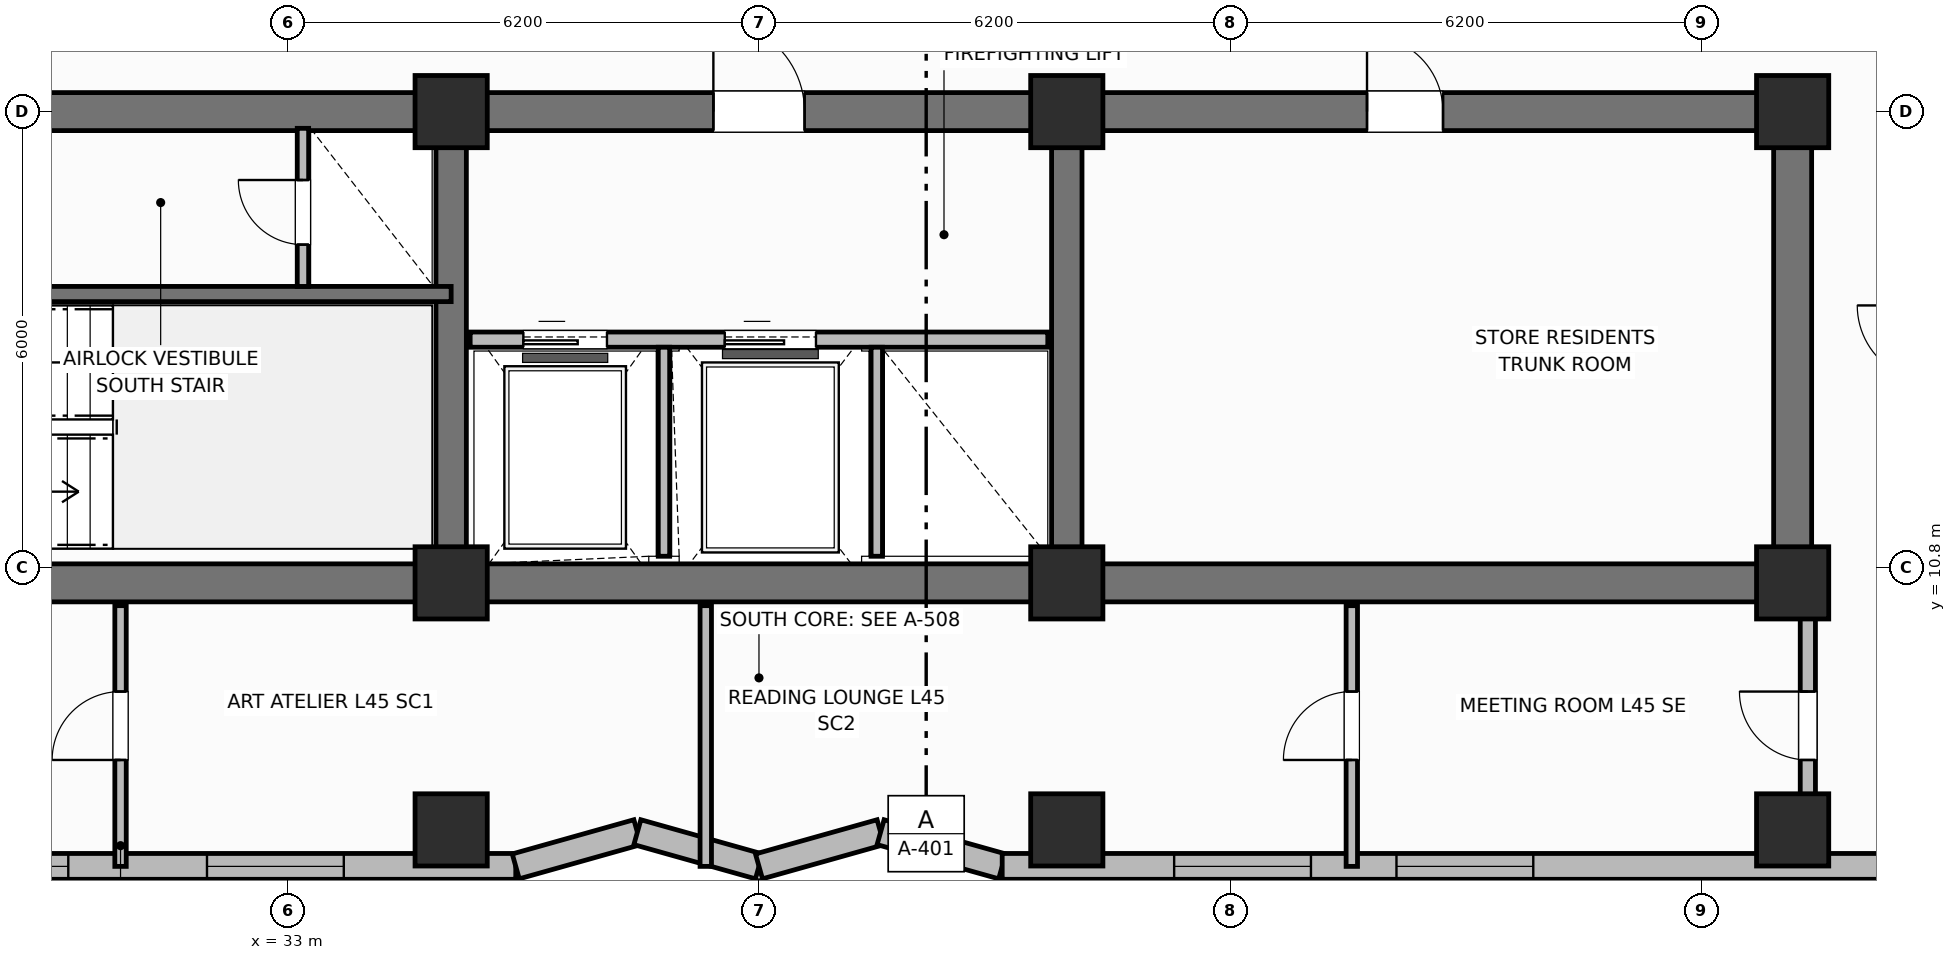
"""IFC4 building model, lengths in metres.
Left out: names, types, materials, properties, quantities, classifications, styles, units other than length and angle.
Written with IfcOpenShell. Run it as: python <this file> out.ifc"""

import sys

from ifc_helpers import new_model, si_unit, direction, frame, frame_2d, origin, origin_2d, place, context, subcontext, project, spatial, rectangle, extrude, element, fill, save


model = new_model("IFC4")
c1 = context("Model", 3, precision=1e-05, world=origin(), true_north=direction((0.0, 1.0)))
c2 = subcontext(c1, "Body", "Model", "MODEL_VIEW")
j1 = project(units=[si_unit("LENGTHUNIT", "METRE"), si_unit("PLANEANGLEUNIT", "RADIAN")], contexts=[c1])
p1 = place(None, origin())
s1 = spatial("IfcSite", under=j1, at=p1, CompositionType="ELEMENT")
p2 = place(p1, origin())
s2 = spatial("IfcBuilding", under=s1, at=p2, CompositionType="ELEMENT")
p3 = place(p2, frame((0.0, 0.0, 181.1)))
s3 = spatial("IfcBuildingStorey", under=s2, at=p3, CompositionType="ELEMENT", Elevation=181.1)
p4 = place(p3, frame((52.8, 10.6, 0.0), z_axis=(0.0, 0.0, 1.0), x_axis=(-1.0, 0.0, 0.0)))
e1 = element("IfcWall", 1, at=p4, inside=s3, PredefinedType="SHEAR", context=c2, shape_type="SweptSolid", body=[
    extrude(rectangle(XDim=27.2, YDim=0.5, at=frame_2d((13.6, 0.0))), origin(), (0.0, 0.0, 1.0), 3.7),
])
p5 = place(p3, frame((52.8, 10.85, 0.0), z_axis=(0.0, 0.0, 1.0), x_axis=(0.0, 1.0, 0.0)))
e2 = element("IfcWall", 2, at=p5, inside=s3, PredefinedType="SHEAR", context=c2, shape_type="SweptSolid", body=[
    extrude(rectangle(XDim=5.7, YDim=0.5, at=frame_2d((2.85, 0.0))), origin(), (0.0, 0.0, 1.0), 3.7),
])
p6 = place(p3, frame((25.6, 16.8, 0.0), z_axis=(0.0, 0.0, 1.0), x_axis=(1.0, 0.0, 0.0)))
e3 = element("IfcWall", 3, at=p6, inside=s3, PredefinedType="SHEAR", context=c2, shape_type="SweptSolid", body=[
    extrude(rectangle(XDim=27.2, YDim=0.5, at=frame_2d((13.6, 0.0))), origin(), (0.0, 0.0, 1.0), 3.7),
])
p7 = place(p6, frame((1.9, 0.0, 0.0)))
e4 = element("IfcOpeningElement", 4, at=p7, cuts=e3, PredefinedType="OPENING", context=c2, shape_type="SweptSolid", body=[
    extrude(rectangle(XDim=1.1, YDim=2.15, at=frame_2d((0.55, 1.075))), frame((0.0, 0.26, 0.0), z_axis=(0.0, -1.0, 0.0), x_axis=(1.0, 0.0, 0.0)), (0.0, 0.0, 1.0), 0.52),
])
p8 = place(p6, frame((13.0, 0.0, 0.0)))
e5 = element("IfcOpeningElement", 5, at=p8, cuts=e3, PredefinedType="OPENING", context=c2, shape_type="SweptSolid", body=[
    extrude(rectangle(XDim=1.2, YDim=2.15, at=frame_2d((0.6, 1.075))), frame((0.0, 0.26, 0.0), z_axis=(0.0, -1.0, 0.0), x_axis=(1.0, 0.0, 0.0)), (0.0, 0.0, 1.0), 0.52),
])
p9 = place(p6, frame((21.6, 0.0, 0.0)))
e6 = element("IfcOpeningElement", 6, at=p9, cuts=e3, PredefinedType="OPENING", context=c2, shape_type="SweptSolid", body=[
    extrude(rectangle(XDim=1.0, YDim=2.15, at=frame_2d((0.5, 1.075))), frame((0.0, 0.26, 0.0), z_axis=(0.0, -1.0, 0.0), x_axis=(1.0, 0.0, 0.0)), (0.0, 0.0, 1.0), 0.52),
])
for number, where, z_axis, x_axis in (
    (7, (35.15, 10.85, 0.0), (0.0, 0.0, 1.0), (0.0, 1.0, 0.0)),
    (8, (43.25, 10.85, 0.0), (0.0, 0.0, 1.0), (0.0, 1.0, 0.0)),
):
    element("IfcWall", number, at=place(p3, frame(where, z_axis=z_axis, x_axis=x_axis)), inside=s3, PredefinedType="SHEAR", context=c2, shape_type="SweptSolid", body=[
        extrude(rectangle(XDim=5.7, YDim=0.4, at=frame_2d((2.85, 0.0))), origin(), (0.0, 0.0, 1.0), 3.7),
    ])
for number, where, z_axis, x_axis in (
    (9, (35.15, 10.6, 0.0), (0.0, 0.0, 1.0), (1.0, 0.0, 0.0)),
    (10, (35.15, 16.8, 0.0), (0.0, 0.0, 1.0), (1.0, 0.0, 0.0)),
    (11, (43.25, 10.6, 0.0), (0.0, 0.0, 1.0), (1.0, 0.0, 0.0)),
    (12, (43.25, 16.8, 0.0), (0.0, 0.0, 1.0), (1.0, 0.0, 0.0)),
    (13, (52.8, 10.6, 0.0), (0.0, 0.0, 1.0), (1.0, 0.0, 0.0)),
    (14, (52.8, 16.8, 0.0), (0.0, 0.0, 1.0), (1.0, 0.0, 0.0)),
    (15, (35.15, 7.35, 0.0), (0.0, 0.0, 1.0), (1.0, 0.0, 0.0)),
    (16, (43.25, 7.35, 0.0), (0.0, 0.0, 1.0), (1.0, 0.0, 0.0)),
    (17, (52.8, 7.35, 0.0), (0.0, 0.0, 1.0), (1.0, 0.0, 0.0)),
):
    element("IfcColumn", number, at=place(p3, frame(where, z_axis=z_axis, x_axis=x_axis)), inside=s3, PredefinedType="COLUMN", context=c2, shape_type="SweptSolid", body=[
        extrude(rectangle(XDim=0.95, YDim=0.95, at=origin_2d()), origin(), (0.0, 0.0, 1.0), 3.7),
    ])
p10 = place(p3, frame((20.2, 6.87, 0.0), z_axis=(0.0, 0.0, 1.0), x_axis=(1.0, 0.0, 0.0)))
e18 = element("IfcWall", 18, at=p10, inside=s3, PredefinedType="SOLIDWALL", context=c2, shape_type="SweptSolid", body=[
    extrude(rectangle(XDim=15.8, YDim=0.34, at=frame_2d((7.9, 0.0))), origin(), (0.0, 0.0, 1.0), 2.72),
])
p11 = place(p10, frame((8.113, 0.0, 0.75)))
e19 = element("IfcOpeningElement", 19, at=p11, cuts=e18, PredefinedType="OPENING", context=c2, shape_type="SweptSolid", body=[
    extrude(rectangle(XDim=1.8, YDim=1.85, at=frame_2d((0.9, 0.925))), frame((0.0, 0.18, 0.0), z_axis=(0.0, -1.0, 0.0), x_axis=(1.0, 0.0, 0.0)), (0.0, 0.0, 1.0), 0.36),
])
p12 = place(p10, frame((11.738, 0.0, 0.75)))
e20 = element("IfcOpeningElement", 20, at=p12, cuts=e18, PredefinedType="OPENING", context=c2, shape_type="SweptSolid", body=[
    extrude(rectangle(XDim=1.8, YDim=1.85, at=frame_2d((0.9, 0.925))), frame((0.0, 0.18, 0.0), z_axis=(0.0, -1.0, 0.0), x_axis=(1.0, 0.0, 0.0)), (0.0, 0.0, 1.0), 0.36),
])
p13 = place(p3, frame((36.0, 6.87, 0.0), z_axis=(0.0, 0.0, 1.0), x_axis=(0.962662902433, 0.270703040766, 0.0)))
e21 = element("IfcWall", 21, at=p13, inside=s3, PredefinedType="SOLIDWALL", context=c2, shape_type="SweptSolid", body=[
    extrude(rectangle(XDim=1.662, YDim=0.34, at=frame_2d((0.831, 0.0))), origin(), (0.0, 0.0, 1.0), 2.72),
])
p14 = place(p3, frame((37.6, 7.32, 0.0), z_axis=(0.0, 0.0, 1.0), x_axis=(0.962652136636, -0.270741322725, 0.0)))
e22 = element("IfcWall", 22, at=p14, inside=s3, PredefinedType="SOLIDWALL", context=c2, shape_type="SweptSolid", body=[
    extrude(rectangle(XDim=1.662, YDim=0.34, at=frame_2d((0.831, 0.0))), origin(), (0.0, 0.0, 1.0), 2.72),
])
p15 = place(p3, frame((39.2, 6.87, 0.0), z_axis=(0.0, 0.0, 1.0), x_axis=(0.962662902433, 0.270703040766, 0.0)))
e23 = element("IfcWall", 23, at=p15, inside=s3, PredefinedType="SOLIDWALL", context=c2, shape_type="SweptSolid", body=[
    extrude(rectangle(XDim=1.662, YDim=0.34, at=frame_2d((0.831, 0.0))), origin(), (0.0, 0.0, 1.0), 2.72),
])
p16 = place(p3, frame((40.8, 7.32, 0.0), z_axis=(0.0, 0.0, 1.0), x_axis=(0.962652136636, -0.270741322725, 0.0)))
e24 = element("IfcWall", 24, at=p16, inside=s3, PredefinedType="SOLIDWALL", context=c2, shape_type="SweptSolid", body=[
    extrude(rectangle(XDim=1.662, YDim=0.34, at=frame_2d((0.831, 0.0))), origin(), (0.0, 0.0, 1.0), 2.72),
])
p17 = place(p3, frame((42.4, 6.87, 0.0), z_axis=(0.0, 0.0, 1.0), x_axis=(1.0, 0.0, 0.0)))
e25 = element("IfcWall", 25, at=p17, inside=s3, PredefinedType="SOLIDWALL", context=c2, shape_type="SweptSolid", body=[
    extrude(rectangle(XDim=15.8, YDim=0.34, at=frame_2d((7.9, 0.0))), origin(), (0.0, 0.0, 1.0), 2.72),
])
p18 = place(p17, frame((2.262, 0.0, 0.75)))
e26 = element("IfcOpeningElement", 26, at=p18, cuts=e25, PredefinedType="OPENING", context=c2, shape_type="SweptSolid", body=[
    extrude(rectangle(XDim=1.8, YDim=1.85, at=frame_2d((0.9, 0.925))), frame((0.0, 0.18, 0.0), z_axis=(0.0, -1.0, 0.0), x_axis=(1.0, 0.0, 0.0)), (0.0, 0.0, 1.0), 0.36),
])
p19 = place(p17, frame((5.188, 0.0, 0.75)))
e27 = element("IfcOpeningElement", 27, at=p19, cuts=e25, PredefinedType="OPENING", context=c2, shape_type="SweptSolid", body=[
    extrude(rectangle(XDim=1.8, YDim=1.85, at=frame_2d((0.9, 0.925))), frame((0.0, 0.18, 0.0), z_axis=(0.0, -1.0, 0.0), x_axis=(1.0, 0.0, 0.0)), (0.0, 0.0, 1.0), 0.36),
])
p20 = place(p17, frame((12.788, 0.0, 0.75)))
e28 = element("IfcOpeningElement", 28, at=p20, cuts=e25, PredefinedType="OPENING", context=c2, shape_type="SweptSolid", body=[
    extrude(rectangle(XDim=1.8, YDim=1.85, at=frame_2d((0.9, 0.925))), frame((0.0, 0.18, 0.0), z_axis=(0.0, -1.0, 0.0), x_axis=(1.0, 0.0, 0.0)), (0.0, 0.0, 1.0), 0.36),
])
p21 = place(p3, frame((25.6, 14.4, 0.0), z_axis=(0.0, 0.0, 1.0), x_axis=(1.0, 0.0, 0.0)))
e29 = element("IfcWall", 29, at=p21, inside=s3, PredefinedType="SHEAR", context=c2, shape_type="SweptSolid", body=[
    extrude(rectangle(XDim=9.55, YDim=0.2, at=frame_2d((4.775, 0.0))), origin(), (0.0, 0.0, 1.0), 3.7),
])
p22 = place(p21, frame((1.05, 0.0, 0.0)))
e30 = element("IfcOpeningElement", 30, at=p22, cuts=e29, PredefinedType="OPENING", context=c2, shape_type="SweptSolid", body=[
    extrude(rectangle(XDim=1.1, YDim=2.15, at=frame_2d((0.55, 1.075))), frame((0.0, 0.11, 0.0), z_axis=(0.0, -1.0, 0.0), x_axis=(1.0, 0.0, 0.0)), (0.0, 0.0, 1.0), 0.22),
])
p23 = place(p3, frame((33.2, 14.5, 0.0), z_axis=(0.0, 0.0, 1.0), x_axis=(0.0, 1.0, 0.0)))
e31 = element("IfcWall", 31, at=p23, inside=s3, PredefinedType="PARTITIONING", context=c2, shape_type="SweptSolid", body=[
    extrude(rectangle(XDim=2.08, YDim=0.15, at=frame_2d((1.04, 0.0))), origin(), (0.0, 0.0, 1.0), 2.55),
])
p24 = place(p23, frame((0.55, 0.0, 0.0)))
e32 = element("IfcOpeningElement", 32, at=p24, cuts=e31, PredefinedType="OPENING", context=c2, shape_type="SweptSolid", body=[
    extrude(rectangle(XDim=0.85, YDim=2.05, at=frame_2d((0.425, 1.025))), frame((0.0, 0.085, 0.0), z_axis=(0.0, -1.0, 0.0), x_axis=(1.0, 0.0, 0.0)), (0.0, 0.0, 1.0), 0.17),
])
p25 = place(p3, frame((35.4, 13.8, 0.0), z_axis=(0.0, 0.0, 1.0), x_axis=(1.0, 0.0, 0.0)))
e33 = element("IfcWall", 33, at=p25, inside=s3, PredefinedType="PARTITIONING", context=c2, shape_type="SweptSolid", body=[
    extrude(rectangle(XDim=7.6, YDim=0.2, at=frame_2d((3.8, 0.0))), origin(), (0.0, 0.0, 1.0), 2.32),
])
p26 = place(p25, frame((0.7, 0.0, 0.0)))
e34 = element("IfcOpeningElement", 34, at=p26, cuts=e33, PredefinedType="OPENING", context=c2, shape_type="SweptSolid", body=[
    extrude(rectangle(XDim=1.1, YDim=2.15, at=frame_2d((0.55, 1.075))), frame((0.0, 0.11, 0.0), z_axis=(0.0, -1.0, 0.0), x_axis=(1.0, 0.0, 0.0)), (0.0, 0.0, 1.0), 0.22),
])
p27 = place(p25, frame((3.35, 0.0, 0.0)))
e35 = element("IfcOpeningElement", 35, at=p27, cuts=e33, PredefinedType="OPENING", context=c2, shape_type="SweptSolid", body=[
    extrude(rectangle(XDim=1.2, YDim=2.15, at=frame_2d((0.6, 1.075))), frame((0.0, 0.11, 0.0), z_axis=(0.0, -1.0, 0.0), x_axis=(1.0, 0.0, 0.0)), (0.0, 0.0, 1.0), 0.22),
])
for number, where, z_axis, x_axis in (
    (36, (37.95, 10.95, 0.0), (0.0, 0.0, 1.0), (0.0, 1.0, 0.0)),
    (37, (40.75, 10.95, 0.0), (0.0, 0.0, 1.0), (0.0, 1.0, 0.0)),
):
    element("IfcWall", number, at=place(p3, frame(where, z_axis=z_axis, x_axis=x_axis)), inside=s3, PredefinedType="PARTITIONING", context=c2, shape_type="SweptSolid", body=[
        extrude(rectangle(XDim=2.75, YDim=0.15, at=frame_2d((1.375, 0.0))), origin(), (0.0, 0.0, 1.0), 2.55),
    ])
p28 = place(p3, frame((30.8, 6.87, 0.0), z_axis=(0.0, 0.0, 1.0), x_axis=(0.0, 1.0, 0.0)))
e38 = element("IfcWall", 38, at=p28, inside=s3, PredefinedType="PARTITIONING", context=c2, shape_type="SweptSolid", body=[
    extrude(rectangle(XDim=3.43, YDim=0.15, at=frame_2d((1.715, 0.0))), origin(), (0.0, 0.0, 1.0), 2.55),
])
p29 = place(p28, frame((1.4, 0.0, 0.0)))
e39 = element("IfcOpeningElement", 39, at=p29, cuts=e38, PredefinedType="OPENING", context=c2, shape_type="SweptSolid", body=[
    extrude(rectangle(XDim=0.9, YDim=2.1, at=frame_2d((0.45, 1.05))), frame((0.0, 0.085, 0.0), z_axis=(0.0, -1.0, 0.0), x_axis=(1.0, 0.0, 0.0)), (0.0, 0.0, 1.0), 0.17),
])
p30 = place(p3, frame((38.5, 6.87, 0.0), z_axis=(0.0, 0.0, 1.0), x_axis=(0.0, 1.0, 0.0)))
e40 = element("IfcWall", 40, at=p30, inside=s3, PredefinedType="PARTITIONING", context=c2, shape_type="SweptSolid", body=[
    extrude(rectangle(XDim=3.43, YDim=0.15, at=frame_2d((1.715, 0.0))), origin(), (0.0, 0.0, 1.0), 2.55),
])
p31 = place(p3, frame((47.0, 6.87, 0.0), z_axis=(0.0, 0.0, 1.0), x_axis=(0.0, 1.0, 0.0)))
e41 = element("IfcWall", 41, at=p31, inside=s3, PredefinedType="PARTITIONING", context=c2, shape_type="SweptSolid", body=[
    extrude(rectangle(XDim=3.43, YDim=0.15, at=frame_2d((1.715, 0.0))), origin(), (0.0, 0.0, 1.0), 2.55),
])
p32 = place(p31, frame((1.4, 0.0, 0.0)))
e42 = element("IfcOpeningElement", 42, at=p32, cuts=e41, PredefinedType="OPENING", context=c2, shape_type="SweptSolid", body=[
    extrude(rectangle(XDim=0.9, YDim=2.1, at=frame_2d((0.45, 1.05))), frame((0.0, 0.085, 0.0), z_axis=(0.0, -1.0, 0.0), x_axis=(1.0, 0.0, 0.0)), (0.0, 0.0, 1.0), 0.17),
])
p33 = place(p3, frame((53.0, 7.62, 0.0), z_axis=(0.0, 0.0, 1.0), x_axis=(0.0, 1.0, 0.0)))
e43 = element("IfcWall", 43, at=p33, inside=s3, PredefinedType="PARTITIONING", context=c2, shape_type="SweptSolid", body=[
    extrude(rectangle(XDim=2.68, YDim=0.2, at=frame_2d((1.34, 0.0))), origin(), (0.0, 0.0, 1.0), 2.55),
])
p34 = place(p33, frame((0.65, 0.0, 0.0)))
e44 = element("IfcOpeningElement", 44, at=p34, cuts=e43, PredefinedType="OPENING", context=c2, shape_type="SweptSolid", body=[
    extrude(rectangle(XDim=0.9, YDim=2.1, at=frame_2d((0.45, 1.05))), frame((0.0, 0.11, 0.0), z_axis=(0.0, -1.0, 0.0), x_axis=(1.0, 0.0, 0.0)), (0.0, 0.0, 1.0), 0.22),
])
p35 = place(p11, origin())
e45 = element("IfcWindow", 45, at=p35, inside=s3, PartitioningType="SINGLE_PANEL", PredefinedType="WINDOW", context=c2, shape_type="SweptSolid", body=[
    extrude(rectangle(XDim=1.8, YDim=1.85, at=frame_2d((0.9, 0.925))), frame((0.0, 0.03, 0.0), z_axis=(0.0, -1.0, 0.0), x_axis=(1.0, 0.0, 0.0)), (0.0, 0.0, 1.0), 0.06),
])
fill(e19, e45)
p36 = place(p12, origin())
e46 = element("IfcWindow", 46, at=p36, inside=s3, PartitioningType="SINGLE_PANEL", PredefinedType="WINDOW", context=c2, shape_type="SweptSolid", body=[
    extrude(rectangle(XDim=1.8, YDim=1.85, at=frame_2d((0.9, 0.925))), frame((0.0, 0.03, 0.0), z_axis=(0.0, -1.0, 0.0), x_axis=(1.0, 0.0, 0.0)), (0.0, 0.0, 1.0), 0.06),
])
fill(e20, e46)
p37 = place(p18, origin())
e47 = element("IfcWindow", 47, at=p37, inside=s3, PartitioningType="SINGLE_PANEL", PredefinedType="WINDOW", context=c2, shape_type="SweptSolid", body=[
    extrude(rectangle(XDim=1.8, YDim=1.85, at=frame_2d((0.9, 0.925))), frame((0.0, 0.03, 0.0), z_axis=(0.0, -1.0, 0.0), x_axis=(1.0, 0.0, 0.0)), (0.0, 0.0, 1.0), 0.06),
])
fill(e26, e47)
p38 = place(p19, origin())
e48 = element("IfcWindow", 48, at=p38, inside=s3, PartitioningType="SINGLE_PANEL", PredefinedType="WINDOW", context=c2, shape_type="SweptSolid", body=[
    extrude(rectangle(XDim=1.8, YDim=1.85, at=frame_2d((0.9, 0.925))), frame((0.0, 0.03, 0.0), z_axis=(0.0, -1.0, 0.0), x_axis=(1.0, 0.0, 0.0)), (0.0, 0.0, 1.0), 0.06),
])
fill(e27, e48)
p39 = place(p24, origin())
e49 = element("IfcDoor", 49, at=p39, inside=s3, OperationType="SINGLE_SWING_RIGHT", PredefinedType="TRAPDOOR", context=c2, shape_type="SweptSolid", body=[
    extrude(rectangle(XDim=0.85, YDim=2.05, at=frame_2d((0.425, 1.025))), frame((0.0, 0.025, 0.0), z_axis=(0.0, -1.0, 0.0), x_axis=(1.0, 0.0, 0.0)), (0.0, 0.0, 1.0), 0.05),
])
fill(e32, e49)
p40 = place(p26, origin())
e50 = element("IfcDoor", 50, at=p40, inside=s3, OperationType="SLIDING_TO_LEFT", PredefinedType="DOOR", context=c2, shape_type="SweptSolid", body=[
    extrude(rectangle(XDim=1.1, YDim=2.15, at=frame_2d((0.55, 1.075))), frame((0.0, 0.025, 0.0), z_axis=(0.0, -1.0, 0.0), x_axis=(1.0, 0.0, 0.0)), (0.0, 0.0, 1.0), 0.05),
])
fill(e34, e50)
p41 = place(p27, origin())
e51 = element("IfcDoor", 51, at=p41, inside=s3, OperationType="SLIDING_TO_LEFT", PredefinedType="DOOR", context=c2, shape_type="SweptSolid", body=[
    extrude(rectangle(XDim=1.2, YDim=2.15, at=frame_2d((0.6, 1.075))), frame((0.0, 0.025, 0.0), z_axis=(0.0, -1.0, 0.0), x_axis=(1.0, 0.0, 0.0)), (0.0, 0.0, 1.0), 0.05),
])
fill(e35, e51)
p42 = place(p29, origin())
e52 = element("IfcDoor", 52, at=p42, inside=s3, OperationType="SINGLE_SWING_LEFT", PredefinedType="DOOR", context=c2, shape_type="SweptSolid", body=[
    extrude(rectangle(XDim=0.9, YDim=2.1, at=frame_2d((0.45, 1.05))), frame((0.0, 0.025, 0.0), z_axis=(0.0, -1.0, 0.0), x_axis=(1.0, 0.0, 0.0)), (0.0, 0.0, 1.0), 0.05),
])
fill(e39, e52)
p43 = place(p32, origin())
e53 = element("IfcDoor", 53, at=p43, inside=s3, OperationType="SINGLE_SWING_LEFT", PredefinedType="DOOR", context=c2, shape_type="SweptSolid", body=[
    extrude(rectangle(XDim=0.9, YDim=2.1, at=frame_2d((0.45, 1.05))), frame((0.0, 0.025, 0.0), z_axis=(0.0, -1.0, 0.0), x_axis=(1.0, 0.0, 0.0)), (0.0, 0.0, 1.0), 0.05),
])
fill(e42, e53)
p44 = place(p34, origin())
e54 = element("IfcDoor", 54, at=p44, inside=s3, OperationType="SINGLE_SWING_RIGHT", PredefinedType="DOOR", context=c2, shape_type="SweptSolid", body=[
    extrude(rectangle(XDim=0.9, YDim=2.1, at=frame_2d((0.45, 1.05))), frame((0.0, 0.025, 0.0), z_axis=(0.0, -1.0, 0.0), x_axis=(1.0, 0.0, 0.0)), (0.0, 0.0, 1.0), 0.05),
])
fill(e44, e54)
p45 = place(p8, origin())
e55 = element("IfcDoor", 55, at=p45, inside=s3, OperationType="SINGLE_SWING_LEFT", PredefinedType="DOOR", context=c2, shape_type="SweptSolid", body=[
    extrude(rectangle(XDim=1.2, YDim=2.15, at=frame_2d((0.6, 1.075))), frame((0.0, 0.025, 0.0), z_axis=(0.0, -1.0, 0.0), x_axis=(1.0, 0.0, 0.0)), (0.0, 0.0, 1.0), 0.05),
])
fill(e5, e55)
p46 = place(p9, origin())
e56 = element("IfcDoor", 56, at=p46, inside=s3, OperationType="SINGLE_SWING_LEFT", PredefinedType="DOOR", context=c2, shape_type="SweptSolid", body=[
    extrude(rectangle(XDim=1.0, YDim=2.15, at=frame_2d((0.5, 1.075))), frame((0.0, 0.025, 0.0), z_axis=(0.0, -1.0, 0.0), x_axis=(1.0, 0.0, 0.0)), (0.0, 0.0, 1.0), 0.05),
])
fill(e6, e56)
save(model, sys.argv[1])
